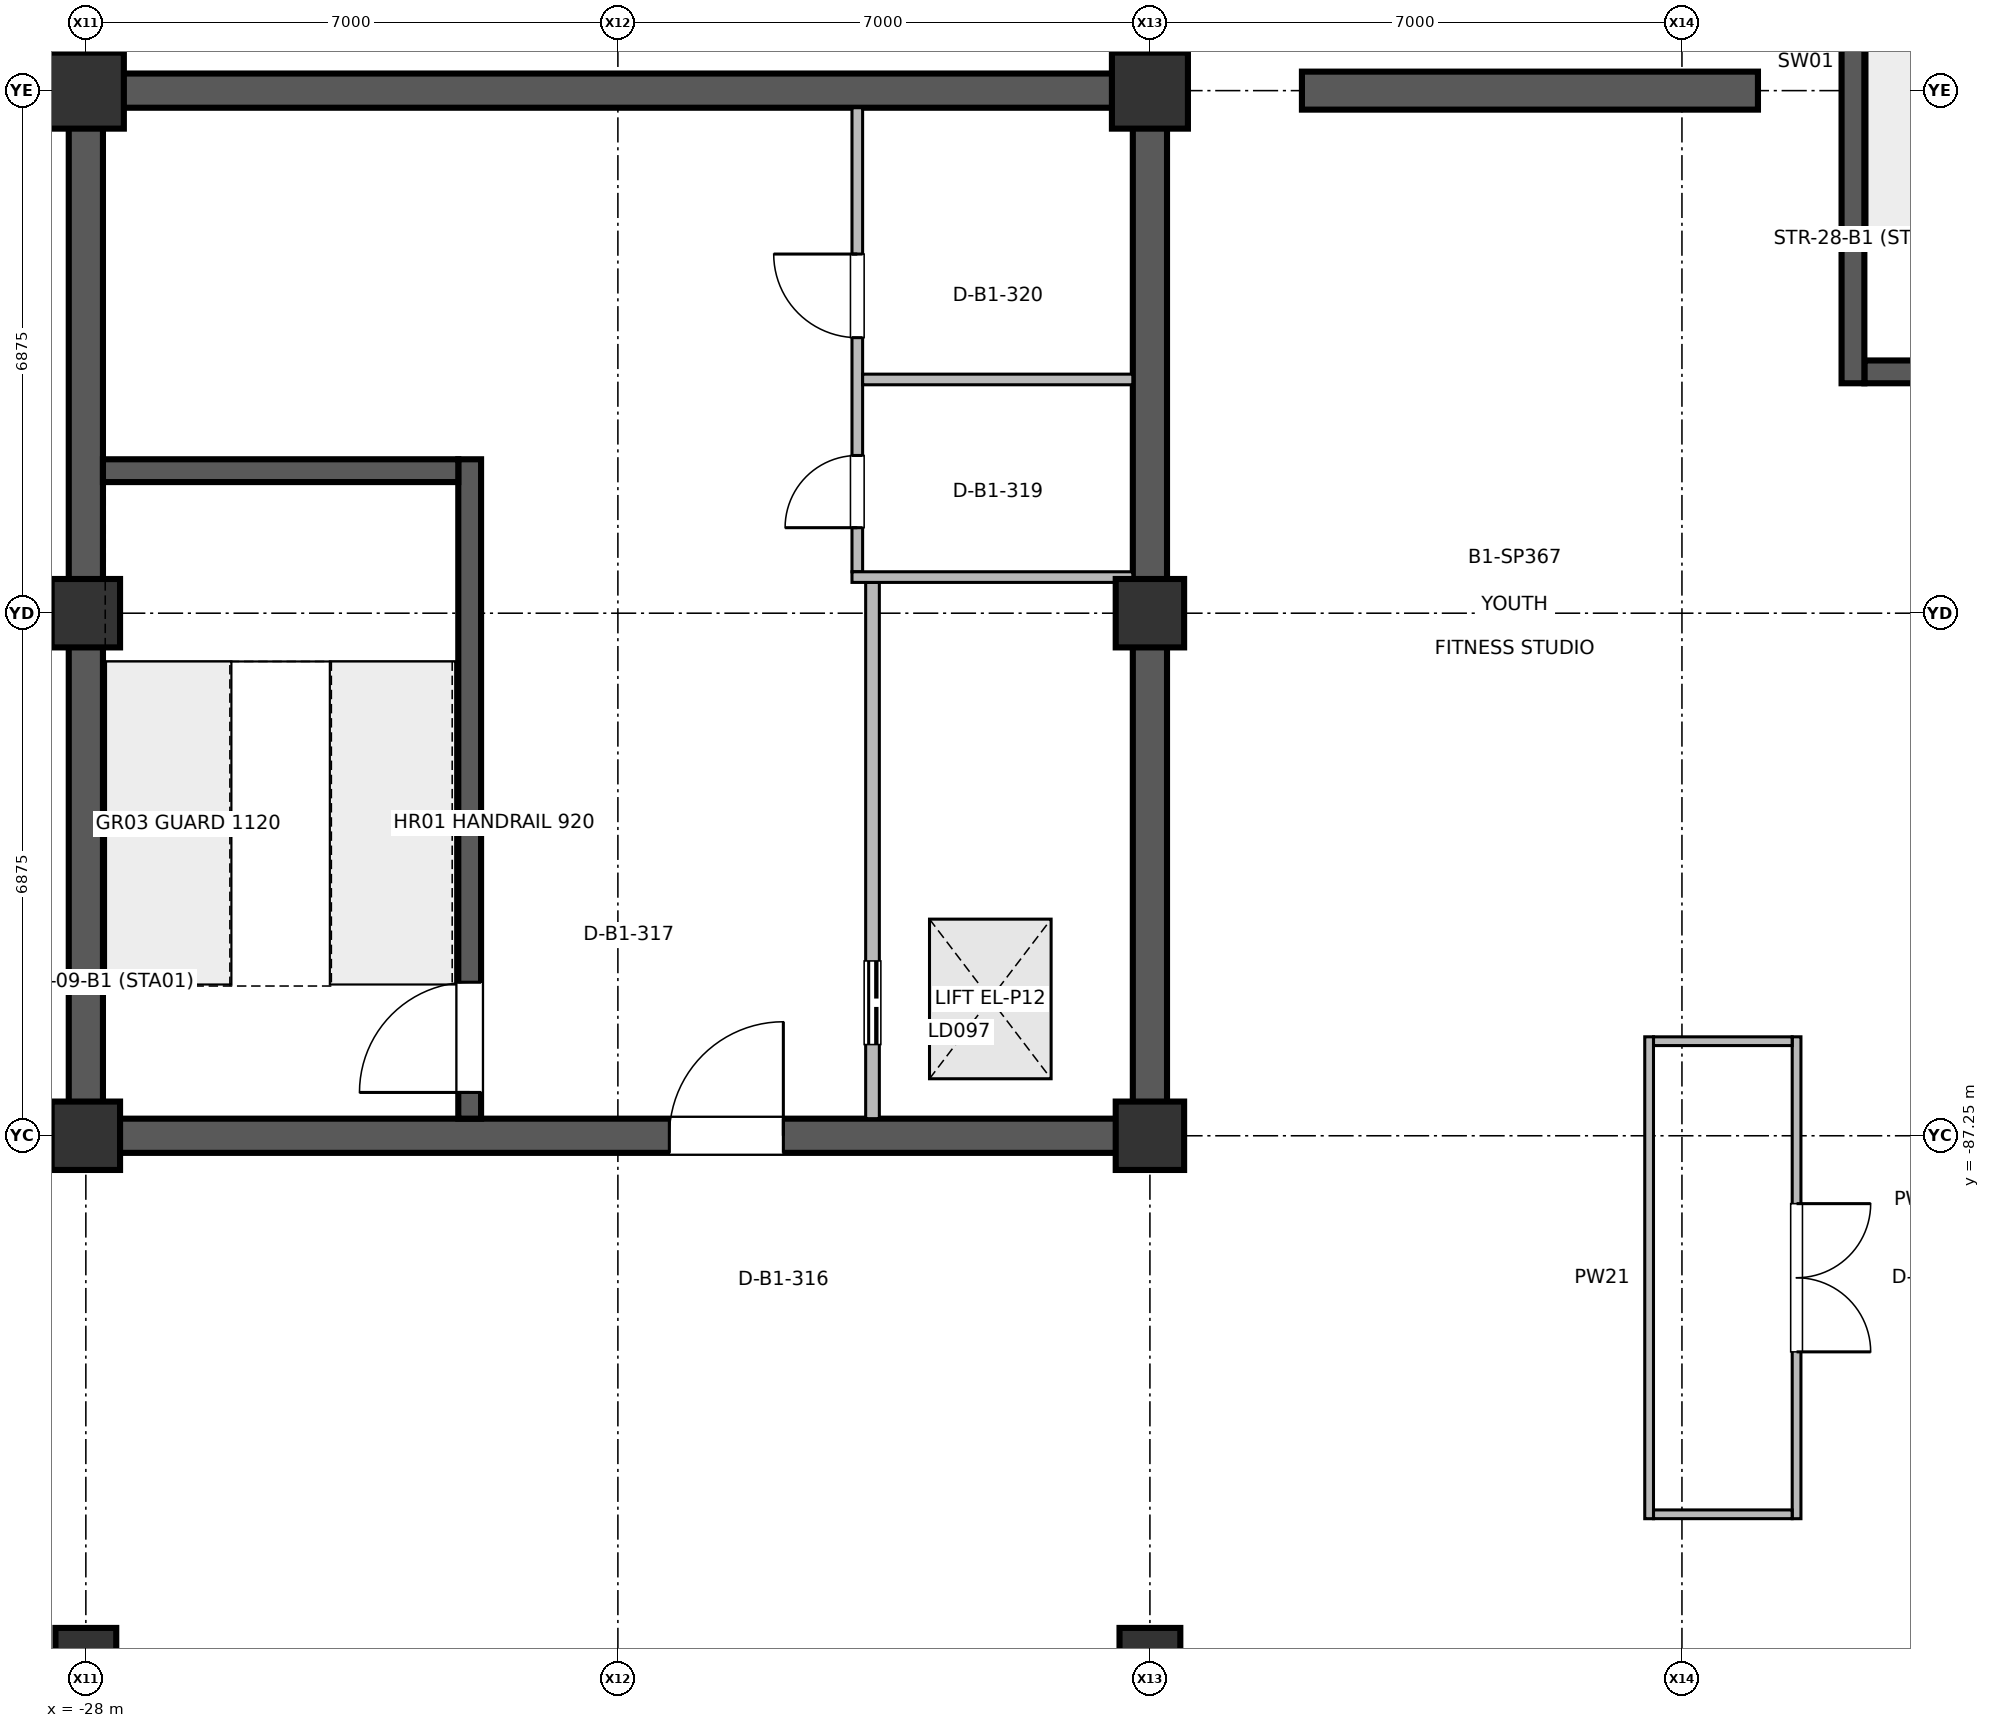
"""IFC4 building model, lengths in metres.
Left out: names, types, materials, properties, quantities, classifications, styles, units other than length and angle.
Written with IfcOpenShell. Run it as: python <this file> out.ifc"""

import sys

from ifc_helpers import new_model, si_unit, direction, frame, frame_2d, origin, origin_2d, place, context, subcontext, project, spatial, rectangle, circle, extrude, element, fill, save


model = new_model("IFC4")
c1 = context("Model", 3, precision=1e-05, world=origin(), true_north=direction((0.0, 1.0)))
c2 = subcontext(c1, "Body", "Model", "MODEL_VIEW")
j1 = project(units=[si_unit("LENGTHUNIT", "METRE"), si_unit("PLANEANGLEUNIT", "RADIAN")], contexts=[c1])
p1 = place(None, origin())
s1 = spatial("IfcSite", under=j1, at=p1, CompositionType="ELEMENT")
p2 = place(p1, origin())
s2 = spatial("IfcBuilding", under=s1, at=p2, CompositionType="ELEMENT")
p3 = place(p2, frame((0.0, 0.0, -6.0)))
s3 = spatial("IfcBuildingStorey", under=s2, at=p3, CompositionType="ELEMENT", Elevation=-6.0)
p4 = place(p3, frame((-28.0, -94.125, 0.0), z_axis=(0.0, 0.0, 1.0), x_axis=(1.0, 0.0, 0.0)))
e1 = element("IfcColumn", 1, at=p4, inside=s3, PredefinedType="COLUMN", context=c2, shape_type="SweptSolid", body=[
    extrude(circle(Radius=0.4, at=origin_2d()), origin(), (0.0, 0.0, 1.0), 5.998),
])
for number, where, z_axis, x_axis in (
    (2, (-28.0, -87.25, 0.0), (0.0, 0.0, 1.0), (1.0, 0.0, 0.0)),
    (3, (-28.0, -80.375, 0.0), (0.0, 0.0, 1.0), (1.0, 0.0, 0.0)),
):
    element("IfcColumn", number, at=place(p3, frame(where, z_axis=z_axis, x_axis=x_axis)), inside=s3, PredefinedType="COLUMN", context=c2, shape_type="SweptSolid", body=[
        extrude(rectangle(XDim=0.9, YDim=0.9, at=origin_2d()), origin(), (0.0, 0.0, 1.0), 5.998),
    ])
p5 = place(p3, frame((-28.0, -73.5, 0.0), z_axis=(0.0, 0.0, 1.0), x_axis=(1.0, 0.0, 0.0)))
e4 = element("IfcColumn", 4, at=p5, inside=s3, PredefinedType="COLUMN", context=c2, shape_type="SweptSolid", body=[
    extrude(rectangle(XDim=1.0, YDim=1.0, at=origin_2d()), origin(), (0.0, 0.0, 1.0), 5.998),
])
p6 = place(p3, frame((-14.0, -94.125, 0.0), z_axis=(0.0, 0.0, 1.0), x_axis=(1.0, 0.0, 0.0)))
e5 = element("IfcColumn", 5, at=p6, inside=s3, PredefinedType="COLUMN", context=c2, shape_type="SweptSolid", body=[
    extrude(circle(Radius=0.4, at=origin_2d()), origin(), (0.0, 0.0, 1.0), 5.998),
])
for number, where, z_axis, x_axis in (
    (6, (-14.0, -87.25, 0.0), (0.0, 0.0, 1.0), (1.0, 0.0, 0.0)),
    (7, (-14.0, -80.375, 0.0), (0.0, 0.0, 1.0), (1.0, 0.0, 0.0)),
):
    element("IfcColumn", number, at=place(p3, frame(where, z_axis=z_axis, x_axis=x_axis)), inside=s3, PredefinedType="COLUMN", context=c2, shape_type="SweptSolid", body=[
        extrude(rectangle(XDim=0.9, YDim=0.9, at=origin_2d()), origin(), (0.0, 0.0, 1.0), 5.998),
    ])
p7 = place(p3, frame((-14.0, -73.5, 0.0), z_axis=(0.0, 0.0, 1.0), x_axis=(1.0, 0.0, 0.0)))
e8 = element("IfcColumn", 8, at=p7, inside=s3, PredefinedType="COLUMN", context=c2, shape_type="SweptSolid", body=[
    extrude(rectangle(XDim=1.0, YDim=1.0, at=origin_2d()), origin(), (0.0, 0.0, 1.0), 5.998),
])
for number, where, z_axis, x_axis in (
    (9, (-28.0, -87.025, 0.0), (0.0, 0.0, 1.0), (0.0, 1.0, 0.0)),
    (10, (-14.0, -87.025, 0.0), (0.0, 0.0, 1.0), (0.0, 1.0, 0.0)),
):
    element("IfcWall", number, at=place(p3, frame(where, z_axis=z_axis, x_axis=x_axis)), inside=s3, PredefinedType="SHEAR", context=c2, shape_type="SweptSolid", body=[
        extrude(rectangle(XDim=13.3, YDim=0.45, at=frame_2d((6.65, 0.0))), origin(), (0.0, 0.0, 1.0), 5.75),
    ])
p8 = place(p3, frame((-27.775, -87.25, 0.0), z_axis=(0.0, 0.0, 1.0), x_axis=(1.0, 0.0, 0.0)))
e11 = element("IfcWall", 11, at=p8, inside=s3, PredefinedType="SHEAR", context=c2, shape_type="SweptSolid", body=[
    extrude(rectangle(XDim=13.55, YDim=0.45, at=frame_2d((6.775, 0.0))), origin(), (0.0, 0.0, 1.0), 5.75),
])
p9 = place(p8, frame((7.452, 0.0, 0.0)))
e12 = element("IfcOpeningElement", 12, at=p9, cuts=e11, PredefinedType="OPENING", context=c2, shape_type="SweptSolid", body=[
    extrude(rectangle(XDim=1.5, YDim=2.2, at=frame_2d((0.75, 1.1))), frame((0.0, 0.235, 0.0), z_axis=(0.0, -1.0, 0.0), x_axis=(1.0, 0.0, 0.0)), (0.0, 0.0, 1.0), 0.47),
])
p10 = place(p3, frame((-27.775, -73.5, 0.0), z_axis=(0.0, 0.0, 1.0), x_axis=(1.0, 0.0, 0.0)))
e13 = element("IfcWall", 13, at=p10, inside=s3, PredefinedType="SHEAR", context=c2, shape_type="SweptSolid", body=[
    extrude(rectangle(XDim=13.55, YDim=0.45, at=frame_2d((6.775, 0.0))), origin(), (0.0, 0.0, 1.0), 5.75),
])
p11 = place(p3, frame((-12.0, -73.5, 0.0), z_axis=(0.0, 0.0, 1.0), x_axis=(1.0, 0.0, 0.0)))
e14 = element("IfcWall", 14, at=p11, inside=s3, PredefinedType="SHEAR", context=c2, shape_type="SweptSolid", body=[
    extrude(rectangle(XDim=6.0, YDim=0.5, at=frame_2d((3.0, 0.0))), origin(), (0.0, 0.0, 1.0), 5.75),
])
p12 = place(p3, frame((-22.95, -87.025, 0.0), z_axis=(0.0, 0.0, 1.0), x_axis=(0.0, 1.0, 0.0)))
e15 = element("IfcWall", 15, at=p12, inside=s3, PredefinedType="SHEAR", context=c2, shape_type="SweptSolid", body=[
    extrude(rectangle(XDim=8.675, YDim=0.3, at=frame_2d((4.337, 0.0))), origin(), (0.0, 0.0, 1.0), 5.75),
])
p13 = place(p12, frame((0.345, 0.0, 0.0)))
e16 = element("IfcOpeningElement", 16, at=p13, cuts=e15, PredefinedType="OPENING", context=c2, shape_type="SweptSolid", body=[
    extrude(rectangle(XDim=1.45, YDim=2.2, at=frame_2d((0.725, 1.1))), frame((0.0, 0.16, 0.0), z_axis=(0.0, -1.0, 0.0), x_axis=(1.0, 0.0, 0.0)), (0.0, 0.0, 1.0), 0.32),
])
p14 = place(p3, frame((-17.65, -87.025, 0.0), z_axis=(0.0, 0.0, 1.0), x_axis=(0.0, 1.0, 0.0)))
e17 = element("IfcWall", 17, at=p14, inside=s3, PredefinedType="PARTITIONING", context=c2, shape_type="SweptSolid", body=[
    extrude(rectangle(XDim=7.055, YDim=0.18, at=frame_2d((3.527, 0.0))), origin(), (0.0, 0.0, 1.0), 5.02),
])
p15 = place(p14, frame((0.975, 0.0, 0.0)))
e18 = element("IfcOpeningElement", 18, at=p15, cuts=e17, PredefinedType="OPENING", context=c2, shape_type="SweptSolid", body=[
    extrude(rectangle(XDim=1.1, YDim=2.2, at=frame_2d((0.55, 1.1))), frame((0.0, 0.1, 0.0), z_axis=(0.0, -1.0, 0.0), x_axis=(1.0, 0.0, 0.0)), (0.0, 0.0, 1.0), 0.2),
])
p16 = place(p3, frame((-17.85, -79.83, 0.0), z_axis=(0.0, 0.0, 1.0), x_axis=(0.0, 1.0, 0.0)))
e19 = element("IfcWall", 19, at=p16, inside=s3, PredefinedType="PARTITIONING", context=c2, shape_type="SweptSolid", body=[
    extrude(rectangle(XDim=6.105, YDim=0.14, at=frame_2d((3.052, 0.0))), origin(), (0.0, 0.0, 1.0), 5.02),
])
p17 = place(p16, frame((0.58, 0.0, 0.0)))
e20 = element("IfcOpeningElement", 20, at=p17, cuts=e19, PredefinedType="OPENING", context=c2, shape_type="SweptSolid", body=[
    extrude(rectangle(XDim=0.95, YDim=2.15, at=frame_2d((0.475, 1.075))), frame((0.0, 0.08, 0.0), z_axis=(0.0, -1.0, 0.0), x_axis=(1.0, 0.0, 0.0)), (0.0, 0.0, 1.0), 0.16),
])
p18 = place(p16, frame((3.08, 0.0, 0.0)))
e21 = element("IfcOpeningElement", 21, at=p18, cuts=e19, PredefinedType="OPENING", context=c2, shape_type="SweptSolid", body=[
    extrude(rectangle(XDim=1.1, YDim=2.15, at=frame_2d((0.55, 1.075))), frame((0.0, 0.08, 0.0), z_axis=(0.0, -1.0, 0.0), x_axis=(1.0, 0.0, 0.0)), (0.0, 0.0, 1.0), 0.16),
])
p19 = place(p3, frame((-5.492, -85.948, 0.0), z_axis=(0.0, 0.0, 1.0), x_axis=(0.0, -1.0, 0.0)))
e22 = element("IfcWall", 22, at=p19, inside=s3, PredefinedType="PARTITIONING", context=c2, shape_type="SweptSolid", body=[
    extrude(rectangle(XDim=6.34, YDim=0.115, at=frame_2d((3.17, 0.0))), origin(), (0.0, 0.0, 1.0), 4.625),
])
p20 = place(p19, frame((2.195, 0.0, 0.0)))
e23 = element("IfcOpeningElement", 23, at=p20, cuts=e22, PredefinedType="OPENING", context=c2, shape_type="SweptSolid", body=[
    extrude(rectangle(XDim=1.95, YDim=2.35, at=frame_2d((0.975, 1.175))), frame((0.0, 0.067, 0.0), z_axis=(0.0, -1.0, 0.0), x_axis=(1.0, 0.0, 0.0)), (0.0, 0.0, 1.0), 0.135),
])
p21 = place(p3, frame((-17.92, -79.9, 0.0), z_axis=(0.0, 0.0, 1.0), x_axis=(1.0, 0.0, 0.0)))
e24 = element("IfcWall", 24, at=p21, inside=s3, PredefinedType="PARTITIONING", context=c2, shape_type="SweptSolid", body=[
    extrude(rectangle(XDim=3.695, YDim=0.14, at=frame_2d((1.847, 0.0))), origin(), (0.0, 0.0, 1.0), 5.02),
])
p22 = place(p3, frame((-17.78, -77.3, 0.0), z_axis=(0.0, 0.0, 1.0), x_axis=(1.0, 0.0, 0.0)))
e25 = element("IfcWall", 25, at=p22, inside=s3, PredefinedType="PARTITIONING", context=c2, shape_type="SweptSolid", body=[
    extrude(rectangle(XDim=3.555, YDim=0.14, at=frame_2d((1.777, 0.0))), origin(), (0.0, 0.0, 1.0), 5.02),
])
p23 = place(p3, frame((-7.432, -92.288, 0.0), z_axis=(0.0, 0.0, 1.0), x_axis=(0.0, 1.0, 0.0)))
e26 = element("IfcWall", 26, at=p23, inside=s3, PredefinedType="PARTITIONING", context=c2, shape_type="SweptSolid", body=[
    extrude(rectangle(XDim=6.34, YDim=0.115, at=frame_2d((3.17, 0.0))), origin(), (0.0, 0.0, 1.0), 4.625),
])
for number, where, z_axis, x_axis in (
    (27, (-7.374, -92.23, 0.0), (0.0, 0.0, 1.0), (1.0, 0.0, 0.0)),
    (28, (-7.374, -86.006, 0.0), (0.0, 0.0, 1.0), (1.0, 0.0, 0.0)),
):
    element("IfcWall", number, at=place(p3, frame(where, z_axis=z_axis, x_axis=x_axis)), inside=s3, PredefinedType="PARTITIONING", context=c2, shape_type="SweptSolid", body=[
        extrude(rectangle(XDim=1.824, YDim=0.115, at=frame_2d((0.912, 0.0))), origin(), (0.0, 0.0, 1.0), 5.02),
    ])
p24 = place(p3, frame((-27.775, -78.5, 0.0), z_axis=(0.0, 0.0, 1.0), x_axis=(1.0, 0.0, 0.0)))
e29 = element("IfcWall", 29, at=p24, inside=s3, PredefinedType="SHEAR", context=c2, shape_type="SweptSolid", body=[
    extrude(rectangle(XDim=4.675, YDim=0.3, at=frame_2d((2.337, 0.0))), origin(), (0.0, 0.0, 1.0), 5.75),
])
p25 = place(p3, frame((-4.6, -77.2, 0.0), z_axis=(0.0, 0.0, 1.0), x_axis=(1.0, 0.0, 0.0)))
e30 = element("IfcWall", 30, at=p25, inside=s3, PredefinedType="SHEAR", context=c2, shape_type="SweptSolid", body=[
    extrude(rectangle(XDim=4.2, YDim=0.3, at=frame_2d((2.1, 0.0))), origin(), (0.0, 0.0, 1.0), 5.75),
])
p26 = place(p25, frame((1.375, 0.0, 0.0)))
e31 = element("IfcOpeningElement", 31, at=p26, cuts=e30, PredefinedType="OPENING", context=c2, shape_type="SweptSolid", body=[
    extrude(rectangle(XDim=1.45, YDim=2.2, at=frame_2d((0.725, 1.1))), frame((0.0, 0.16, 0.0), z_axis=(0.0, -1.0, 0.0), x_axis=(1.0, 0.0, 0.0)), (0.0, 0.0, 1.0), 0.32),
])
p27 = place(p3, frame((-4.75, -77.35, 0.0), z_axis=(0.0, 0.0, 1.0), x_axis=(0.0, 1.0, 0.0)))
e32 = element("IfcWall", 32, at=p27, inside=s3, PredefinedType="SHEAR", context=c2, shape_type="SweptSolid", body=[
    extrude(rectangle(XDim=8.45, YDim=0.3, at=frame_2d((4.225, 0.0))), origin(), (0.0, 0.0, 1.0), 5.75),
])
p28 = place(p9, origin())
e33 = element("IfcDoor", 33, at=p28, inside=s3, OperationType="SINGLE_SWING_RIGHT", PredefinedType="DOOR", context=c2, shape_type="SweptSolid", body=[
    extrude(rectangle(XDim=1.5, YDim=2.2, at=frame_2d((0.75, 1.1))), frame((0.0, 0.025, 0.0), z_axis=(0.0, -1.0, 0.0), x_axis=(1.0, 0.0, 0.0)), (0.0, 0.0, 1.0), 0.05),
])
fill(e12, e33)
p29 = place(p13, origin())
e34 = element("IfcDoor", 34, at=p29, inside=s3, OperationType="SINGLE_SWING_LEFT", PredefinedType="DOOR", context=c2, shape_type="SweptSolid", body=[
    extrude(rectangle(XDim=1.45, YDim=2.2, at=frame_2d((0.725, 1.1))), frame((0.0, 0.025, 0.0), z_axis=(0.0, -1.0, 0.0), x_axis=(1.0, 0.0, 0.0)), (0.0, 0.0, 1.0), 0.05),
])
fill(e16, e34)
p30 = place(p15, origin())
e35 = element("IfcDoor", 35, at=p30, inside=s3, OperationType="DOUBLE_DOOR_SLIDING", PredefinedType="DOOR", context=c2, shape_type="SweptSolid", body=[
    extrude(rectangle(XDim=1.1, YDim=2.2, at=frame_2d((0.55, 1.1))), frame((0.0, 0.025, 0.0), z_axis=(0.0, -1.0, 0.0), x_axis=(1.0, 0.0, 0.0)), (0.0, 0.0, 1.0), 0.05),
])
fill(e18, e35)
p31 = place(p17, origin())
e36 = element("IfcDoor", 36, at=p31, inside=s3, OperationType="SINGLE_SWING_LEFT", PredefinedType="DOOR", context=c2, shape_type="SweptSolid", body=[
    extrude(rectangle(XDim=0.95, YDim=2.15, at=frame_2d((0.475, 1.075))), frame((0.0, 0.025, 0.0), z_axis=(0.0, -1.0, 0.0), x_axis=(1.0, 0.0, 0.0)), (0.0, 0.0, 1.0), 0.05),
])
fill(e20, e36)
p32 = place(p18, origin())
e37 = element("IfcDoor", 37, at=p32, inside=s3, OperationType="SINGLE_SWING_RIGHT", PredefinedType="DOOR", context=c2, shape_type="SweptSolid", body=[
    extrude(rectangle(XDim=1.1, YDim=2.15, at=frame_2d((0.55, 1.075))), frame((0.0, 0.025, 0.0), z_axis=(0.0, -1.0, 0.0), x_axis=(1.0, 0.0, 0.0)), (0.0, 0.0, 1.0), 0.05),
])
fill(e21, e37)
p33 = place(p20, origin())
e38 = element("IfcDoor", 38, at=p33, inside=s3, OperationType="DOUBLE_DOOR_SINGLE_SWING", PredefinedType="DOOR", context=c2, shape_type="SweptSolid", body=[
    extrude(rectangle(XDim=1.95, YDim=2.35, at=frame_2d((0.975, 1.175))), frame((0.0, 0.025, 0.0), z_axis=(0.0, -1.0, 0.0), x_axis=(1.0, 0.0, 0.0)), (0.0, 0.0, 1.0), 0.05),
])
fill(e23, e38)
save(model, sys.argv[1])
